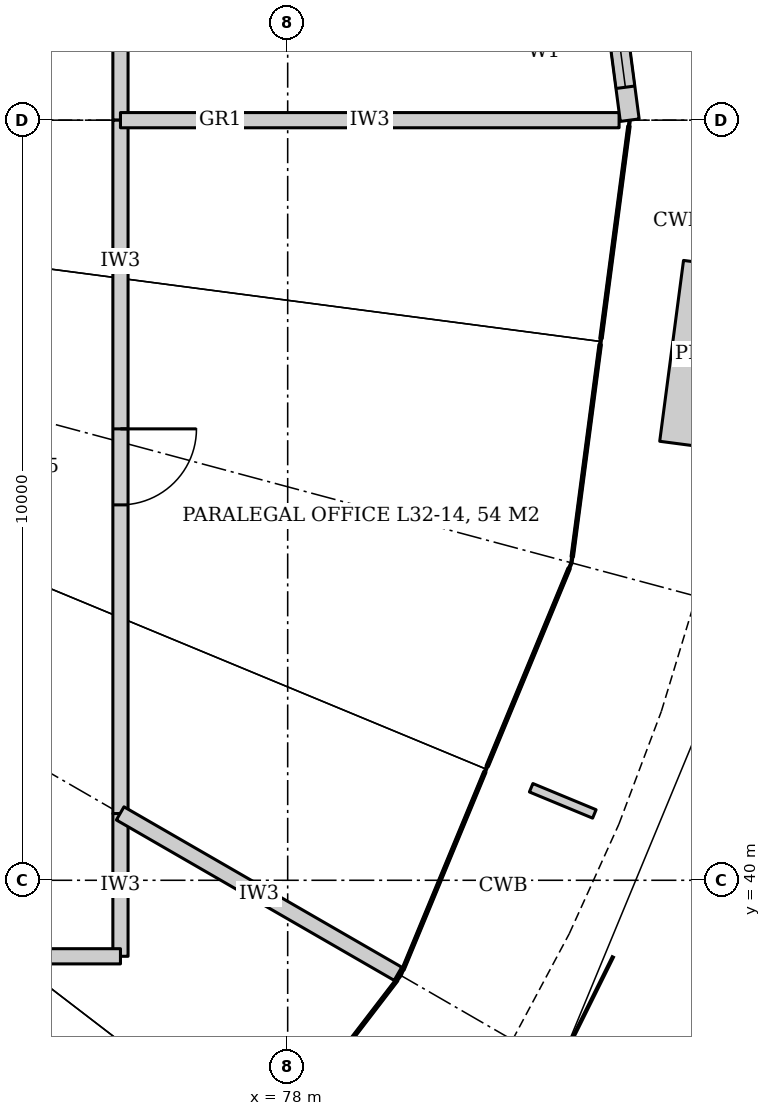
"""IFC4 building model, lengths in metres.
Left out: names, types, materials, properties, quantities, classifications, styles, units other than length and angle.
Written with IfcOpenShell. Run it as: python <this file> out.ifc"""

import sys

from ifc_helpers import new_model, si_unit, direction, frame, frame_2d, origin, place, context, subcontext, project, spatial, rectangle, extrude, element, fill, save


model = new_model("IFC4")
c1 = context("Model", 3, precision=1e-05, world=origin(), true_north=direction((0.0, 1.0)))
c2 = subcontext(c1, "Body", "Model", "MODEL_VIEW")
j1 = project(units=[si_unit("LENGTHUNIT", "METRE"), si_unit("PLANEANGLEUNIT", "RADIAN")], contexts=[c1])
p1 = place(None, origin())
s1 = spatial("IfcSite", under=j1, at=p1, CompositionType="ELEMENT")
p2 = place(p1, origin())
s2 = spatial("IfcBuilding", under=s1, at=p2, CompositionType="ELEMENT")
p3 = place(p2, frame((0.0, 0.0, 135.2)))
s3 = spatial("IfcBuildingStorey", under=s2, at=p3, CompositionType="ELEMENT", Elevation=135.2)
p4 = place(p3, frame((75.8, 59.05, 0.0), z_axis=(0.0, 0.0, 1.0), x_axis=(0.0, -1.0, 0.0)))
e1 = element("IfcWall", 1, at=p4, inside=s3, PredefinedType="PARTITIONING", context=c2, shape_type="SweptSolid", body=[
    extrude(rectangle(XDim=9.05, YDim=0.2, at=frame_2d((4.525, 0.0))), origin(), (0.0, 0.0, 1.0), 3.04),
])
p5 = place(p3, frame((75.8, 50.0, 0.0), z_axis=(0.0, 0.0, 1.0), x_axis=(0.0, -1.0, 0.0)))
e2 = element("IfcWall", 2, at=p5, inside=s3, PredefinedType="PARTITIONING", context=c2, shape_type="SweptSolid", body=[
    extrude(rectangle(XDim=9.122, YDim=0.2, at=frame_2d((4.561, 0.0))), origin(), (0.0, 0.0, 1.0), 3.04),
])
p6 = place(p5, frame((4.061, 0.0, 0.0)))
e3 = element("IfcOpeningElement", 3, at=p6, cuts=e2, PredefinedType="OPENING", context=c2, shape_type="SweptSolid", body=[
    extrude(rectangle(XDim=1.0, YDim=2.1, at=frame_2d((0.5, 1.05))), frame((0.0, 0.11, 0.0), z_axis=(0.0, -1.0, 0.0), x_axis=(1.0, 0.0, 0.0)), (0.0, 0.0, 1.0), 0.22),
])
p7 = place(p3, frame((75.8, 40.878, 0.0), z_axis=(0.0, 0.0, 1.0), x_axis=(0.0, -1.0, 0.0)))
e4 = element("IfcWall", 4, at=p7, inside=s3, PredefinedType="PARTITIONING", context=c2, shape_type="SweptSolid", body=[
    extrude(rectangle(XDim=1.878, YDim=0.2, at=frame_2d((0.939, 0.0))), origin(), (0.0, 0.0, 1.0), 3.04),
])
p8 = place(p3, frame((75.8, 39.0, 0.0), z_axis=(0.0, 0.0, 1.0), x_axis=(-1.0, 0.0, 0.0)))
e5 = element("IfcWall", 5, at=p8, inside=s3, PredefinedType="PARTITIONING", context=c2, shape_type="SweptSolid", body=[
    extrude(rectangle(XDim=2.8, YDim=0.2, at=frame_2d((1.4, 0.0))), origin(), (0.0, 0.0, 1.0), 3.04),
])
p9 = place(p3, frame((75.8, 50.0, 0.0), z_axis=(0.0, 0.0, 1.0), x_axis=(1.0, 0.0, 0.0)))
e6 = element("IfcWall", 6, at=p9, inside=s3, PredefinedType="PARTITIONING", context=c2, shape_type="SweptSolid", body=[
    extrude(rectangle(XDim=6.66, YDim=0.2, at=frame_2d((3.33, 0.0))), origin(), (0.0, 0.0, 1.0), 3.04),
])
p10 = place(p3, frame((75.796, 40.88, 0.0), z_axis=(0.0, 0.0, 1.0), x_axis=(0.866033125095, -0.499986626058, 0.0)))
e7 = element("IfcWall", 7, at=p10, inside=s3, PredefinedType="PARTITIONING", context=c2, shape_type="SweptSolid", body=[
    extrude(rectangle(XDim=4.32, YDim=0.2, at=frame_2d((2.16, 0.0))), origin(), (0.0, 0.0, 1.0), 3.04),
])
p11 = place(p3, frame((82.6, 50.0, 0.0), z_axis=(0.0, 0.0, 1.0), x_axis=(-0.130556203128, 0.991440909901, 0.0)))
e8 = element("IfcWall", 8, at=p11, inside=s3, PredefinedType="SOLIDWALL", context=c2, shape_type="SweptSolid", body=[
    extrude(rectangle(XDim=5.9, YDim=0.25, at=frame_2d((2.95, 0.0))), origin(), (0.0, 0.0, 1.0), 4.04),
])
p12 = place(p11, frame((2.05, 0.0, 0.0)))
e9 = element("IfcOpeningElement", 9, at=p12, cuts=e8, PredefinedType="OPENING", context=c2, shape_type="SweptSolid", body=[
    extrude(rectangle(XDim=1.8, YDim=2.4, at=frame_2d((0.9, 1.2))), frame((0.0, 0.135, 0.0), z_axis=(0.0, -1.0, 0.0), x_axis=(1.0, 0.0, 0.0)), (0.0, 0.0, 1.0), 0.27),
])
p13 = place(p11, frame((0.45, 0.0, 0.0)))
e10 = element("IfcOpeningElement", 10, at=p13, cuts=e8, PredefinedType="OPENING", context=c2, shape_type="SweptSolid", body=[
    extrude(rectangle(XDim=1.2, YDim=2.4, at=frame_2d((0.6, 1.2))), frame((0.0, 0.135, 0.0), z_axis=(0.0, -1.0, 0.0), x_axis=(1.0, 0.0, 0.0)), (0.0, 0.0, 1.0), 0.27),
])
p14 = place(p11, frame((4.25, 0.0, 0.0)))
e11 = element("IfcOpeningElement", 11, at=p14, cuts=e8, PredefinedType="OPENING", context=c2, shape_type="SweptSolid", body=[
    extrude(rectangle(XDim=1.2, YDim=2.4, at=frame_2d((0.6, 1.2))), frame((0.0, 0.135, 0.0), z_axis=(0.0, -1.0, 0.0), x_axis=(1.0, 0.0, 0.0)), (0.0, 0.0, 1.0), 0.27),
])
p15 = place(p6, origin())
e12 = element("IfcDoor", 12, at=p15, inside=s3, OperationType="SINGLE_SWING_LEFT", PredefinedType="DOOR", context=c2, shape_type="SweptSolid", body=[
    extrude(rectangle(XDim=1.0, YDim=2.1, at=frame_2d((0.5, 1.05))), frame((0.0, 0.025, 0.0), z_axis=(0.0, -1.0, 0.0), x_axis=(1.0, 0.0, 0.0)), (0.0, 0.0, 1.0), 0.05),
])
fill(e3, e12)
p16 = place(p13, origin())
e13 = element("IfcWindow", 13, at=p16, inside=s3, PartitioningType="SINGLE_PANEL", PredefinedType="WINDOW", context=c2, shape_type="SweptSolid", body=[
    extrude(rectangle(XDim=1.2, YDim=2.4, at=frame_2d((0.6, 1.2))), frame((0.0, 0.03, 0.0), z_axis=(0.0, -1.0, 0.0), x_axis=(1.0, 0.0, 0.0)), (0.0, 0.0, 1.0), 0.06),
])
fill(e10, e13)
save(model, sys.argv[1])
